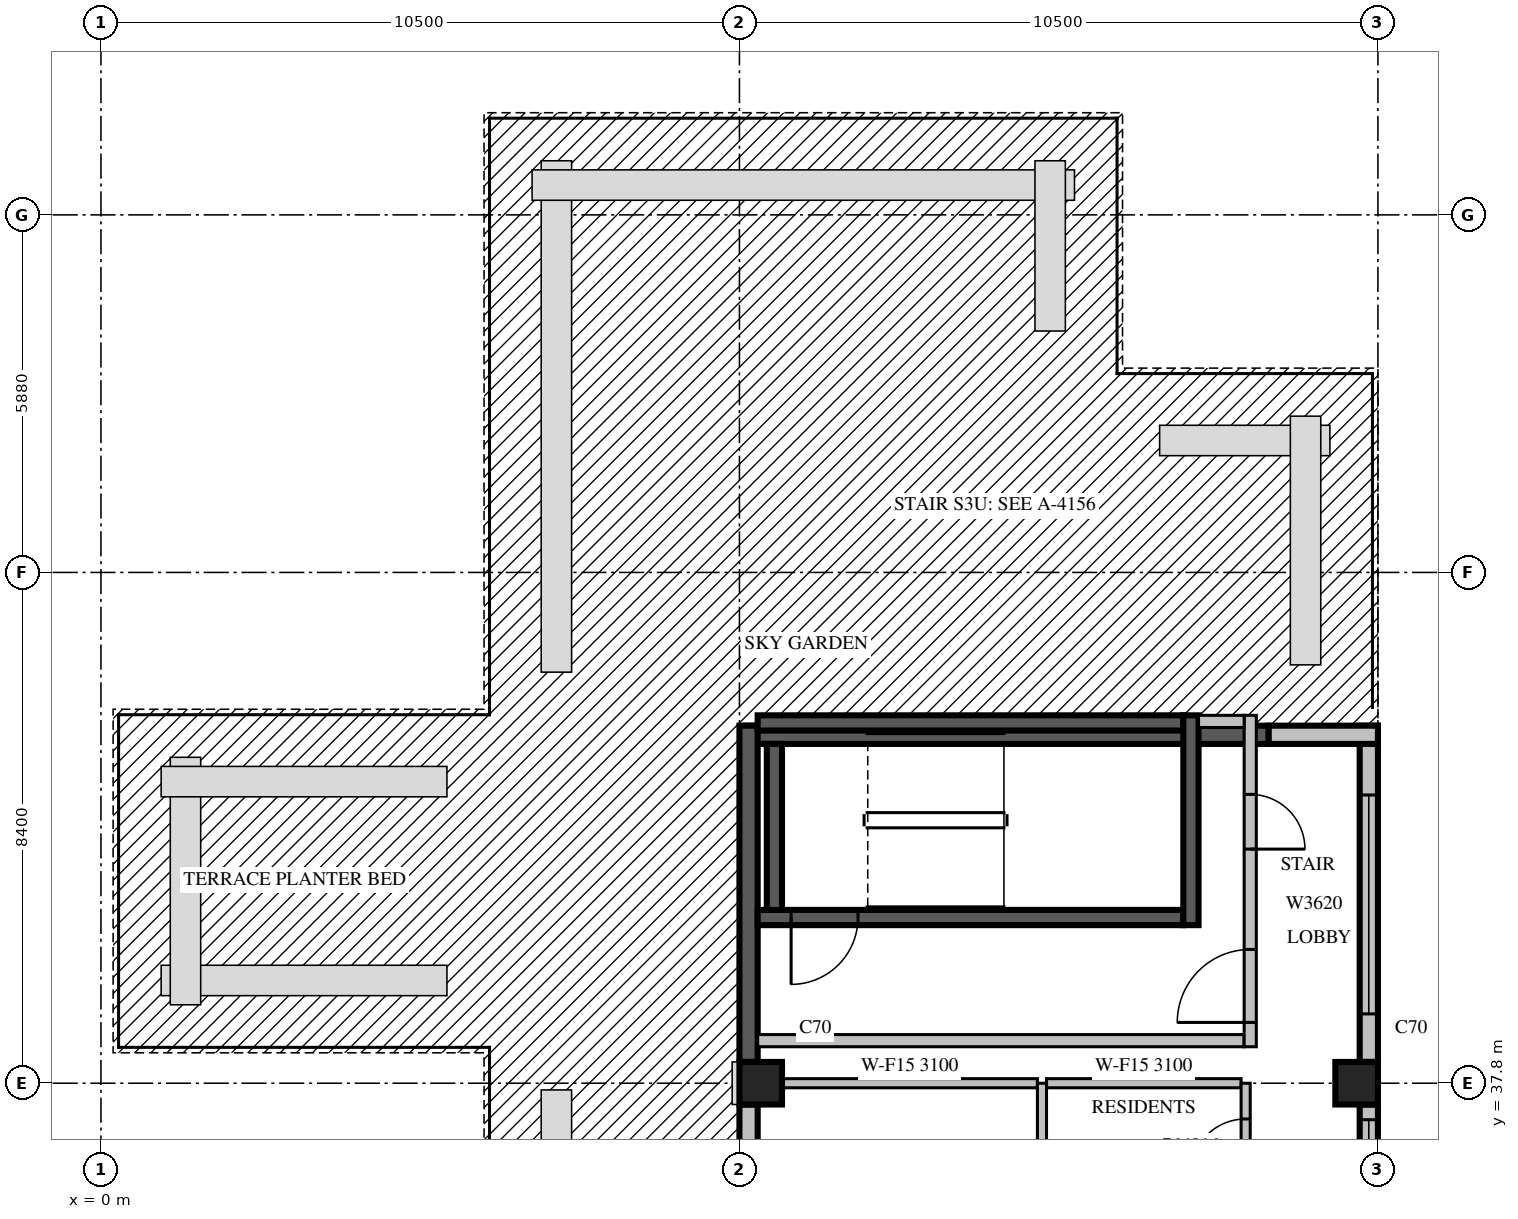
"""IFC4 building model, lengths in metres.
Left out: names, types, materials, properties, quantities, classifications, styles, units other than length and angle.
Written with IfcOpenShell. Run it as: python <this file> out.ifc"""

import sys

from ifc_helpers import new_model, si_unit, direction, frame, frame_2d, origin, origin_2d, place, context, subcontext, project, spatial, rectangle, extrude, source, transform, mapped, element, fill, save


model = new_model("IFC4")
c1 = context("Model", 3, precision=1e-05, world=origin(), true_north=direction((0.0, 1.0)))
c2 = subcontext(c1, "Body", "Model", "MODEL_VIEW")
j1 = project(units=[si_unit("LENGTHUNIT", "METRE"), si_unit("PLANEANGLEUNIT", "RADIAN")], contexts=[c1])
p1 = place(None, origin())
s1 = spatial("IfcSite", under=j1, at=p1, CompositionType="ELEMENT")
p2 = place(p1, origin())
s2 = spatial("IfcBuilding", under=s1, at=p2, CompositionType="ELEMENT")
p3 = place(p2, frame((0.0, 0.0, 284.5)))
s3 = spatial("IfcBuildingStorey", under=s2, at=p3, CompositionType="ELEMENT", Elevation=284.5)
m1 = source(origin(), c2, "Body", "SweptSolid", [
    extrude(rectangle(XDim=0.7, YDim=0.7, at=origin_2d()), origin(), (0.0, 0.0, 1.0), 3.5),
])
for number, where, z_axis, x_axis in (
    (1, (10.85, 37.8, 0.0), (0.0, 0.0, 1.0), (1.0, 0.0, 0.0)),
    (2, (20.65, 37.8, 0.0), (0.0, 0.0, 1.0), (1.0, 0.0, 0.0)),
):
    element("IfcColumn", number, at=place(p3, frame(where, z_axis=z_axis, x_axis=x_axis)), inside=s3, PredefinedType="COLUMN", context=c2, shape_type="MappedRepresentation", body=[
        mapped(m1, transform((0.0, 0.0, 0.0), scale=1.0)),
    ])
p4 = place(p3, frame((20.85, 29.75, 0.0), z_axis=(0.0, 0.0, 1.0), x_axis=(0.0, 1.0, 0.0)))
e3 = element("IfcWall", 3, at=p4, inside=s3, PredefinedType="STANDARD", context=c2, shape_type="SweptSolid", body=[
    extrude(rectangle(XDim=7.7, YDim=0.3, at=frame_2d((3.85, 0.0))), origin(), (0.0, 0.0, 1.0), 2.6),
])
m2 = source(origin(), c2, "Body", "SweptSolid", [
    extrude(rectangle(XDim=3.0, YDim=2.0, at=frame_2d((1.5, 1.0))), frame((0.0, 0.16, 0.0), z_axis=(0.0, -1.0, 0.0), x_axis=(1.0, 0.0, 0.0)), (0.0, 0.0, 1.0), 0.32),
])
p5 = place(p4, frame((0.25, 0.0, 0.6)))
e4 = element("IfcOpeningElement", 4, at=p5, cuts=e3, PredefinedType="OPENING", context=c2, shape_type="MappedRepresentation", body=[
    mapped(m2, transform((0.0, 0.0, 0.0), scale=1.0)),
])
p6 = place(p4, frame((4.45, 0.0, 0.6)))
e5 = element("IfcOpeningElement", 5, at=p6, cuts=e3, PredefinedType="OPENING", context=c2, shape_type="MappedRepresentation", body=[
    mapped(m2, transform((0.0, 0.0, 0.0), scale=1.0)),
])
p7 = place(p3, frame((20.85, 38.15, 0.0), z_axis=(0.0, 0.0, 1.0), x_axis=(0.0, 1.0, 0.0)))
e6 = element("IfcWall", 6, at=p7, inside=s3, PredefinedType="STANDARD", context=c2, shape_type="SweptSolid", body=[
    extrude(rectangle(XDim=5.53, YDim=0.3, at=frame_2d((2.765, 0.0))), origin(), (0.0, 0.0, 1.0), 3.1),
])
m3 = source(origin(), c2, "Body", "SweptSolid", [
    extrude(rectangle(XDim=3.6, YDim=2.0, at=frame_2d((1.8, 1.0))), frame((0.0, 0.16, 0.0), z_axis=(0.0, -1.0, 0.0), x_axis=(1.0, 0.0, 0.0)), (0.0, 0.0, 1.0), 0.32),
])
p8 = place(p7, frame((0.79, 0.0, 0.6)))
e7 = element("IfcOpeningElement", 7, at=p8, cuts=e6, PredefinedType="OPENING", context=c2, shape_type="MappedRepresentation", body=[
    mapped(m3, transform((0.0, 0.0, 0.0), scale=1.0)),
])
p9 = place(p3, frame((21.0, 43.53, 0.0), z_axis=(0.0, 0.0, 1.0), x_axis=(-1.0, 0.0, 0.0)))
e8 = element("IfcWall", 8, at=p9, inside=s3, PredefinedType="STANDARD", context=c2, shape_type="SweptSolid", body=[
    extrude(rectangle(XDim=1.8, YDim=0.3, at=frame_2d((0.9, 0.0))), origin(), (0.0, 0.0, 1.0), 3.1),
])
p10 = place(p3, frame((19.2, 43.53, 0.0), z_axis=(0.0, 0.0, 1.0), x_axis=(-1.0, 0.0, 0.0)))
e9 = element("IfcWall", 9, at=p10, inside=s3, PredefinedType="SOLIDWALL", context=c2, shape_type="SweptSolid", body=[
    extrude(rectangle(XDim=8.6, YDim=0.3, at=frame_2d((4.3, 0.0))), origin(), (0.0, 0.0, 1.0), 3.1),
])
p11 = place(p3, frame((10.65, 43.68, 0.0), z_axis=(0.0, 0.0, 1.0), x_axis=(0.0, -1.0, 0.0)))
e10 = element("IfcWall", 10, at=p11, inside=s3, PredefinedType="SOLIDWALL", context=c2, shape_type="SweptSolid", body=[
    extrude(rectangle(XDim=5.53, YDim=0.3, at=frame_2d((2.765, 0.0))), origin(), (0.0, 0.0, 1.0), 3.1),
])
m4 = source(origin(), c2, "Body", "SweptSolid", [
    extrude(rectangle(XDim=7.7, YDim=0.3, at=frame_2d((3.85, 0.0))), origin(), (0.0, 0.0, 1.0), 3.1),
])
p12 = place(p3, frame((10.65, 37.45, 0.0), z_axis=(0.0, 0.0, 1.0), x_axis=(0.0, -1.0, 0.0)))
e11 = element("IfcWall", 11, at=p12, inside=s3, PredefinedType="STANDARD", context=c2, shape_type="MappedRepresentation", body=[
    mapped(m4, transform((0.0, 0.0, 0.0), scale=1.0)),
])
m5 = source(origin(), c2, "Body", "SweptSolid", [
    extrude(rectangle(XDim=1.8, YDim=2.4, at=frame_2d((0.9, 1.2))), frame((0.0, 0.16, 0.0), z_axis=(0.0, -1.0, 0.0), x_axis=(1.0, 0.0, 0.0)), (0.0, 0.0, 1.0), 0.32),
])
p13 = place(p12, frame((3.37, 0.0, 0.0)))
e12 = element("IfcOpeningElement", 12, at=p13, cuts=e11, PredefinedType="OPENING", context=c2, shape_type="MappedRepresentation", body=[
    mapped(m5, transform((0.0, 0.0, 0.0), scale=1.0)),
])
m6 = source(origin(), c2, "Body", "SweptSolid", [
    extrude(rectangle(XDim=1.8, YDim=2.0, at=frame_2d((0.9, 1.0))), frame((0.0, 0.16, 0.0), z_axis=(0.0, -1.0, 0.0), x_axis=(1.0, 0.0, 0.0)), (0.0, 0.0, 1.0), 0.32),
])
p14 = place(p12, frame((0.735, 0.0, 0.6)))
e13 = element("IfcOpeningElement", 13, at=p14, cuts=e11, PredefinedType="OPENING", context=c2, shape_type="MappedRepresentation", body=[
    mapped(m6, transform((0.0, 0.0, 0.0), scale=1.0)),
])
m7 = source(origin(), c2, "Body", "SweptSolid", [
    extrude(rectangle(XDim=7.0, YDim=0.25, at=frame_2d((3.5, 0.0))), origin(), (0.0, 0.0, 1.0), 3.1),
])
p15 = place(p3, frame((10.8, 40.525, 0.0), z_axis=(0.0, 0.0, 1.0), x_axis=(1.0, 0.0, 0.0)))
e14 = element("IfcWall", 14, at=p15, inside=s3, PredefinedType="SOLIDWALL", context=c2, shape_type="MappedRepresentation", body=[
    mapped(m7, transform((0.0, 0.0, 0.0), scale=1.0)),
])
m8 = source(origin(), c2, "Body", "SweptSolid", [
    extrude(rectangle(XDim=1.1, YDim=2.1, at=frame_2d((0.55, 1.05))), frame((0.0, 0.135, 0.0), z_axis=(0.0, -1.0, 0.0), x_axis=(1.0, 0.0, 0.0)), (0.0, 0.0, 1.0), 0.27),
])
p16 = place(p15, frame((0.55, 0.0, 0.0)))
e15 = element("IfcOpeningElement", 15, at=p16, cuts=e14, PredefinedType="OPENING", context=c2, shape_type="MappedRepresentation", body=[
    mapped(m8, transform((0.0, 0.0, 0.0), scale=1.0)),
])
p17 = place(p3, frame((10.8, 43.725, 0.0), z_axis=(0.0, 0.0, 1.0), x_axis=(1.0, 0.0, 0.0)))
e16 = element("IfcWall", 16, at=p17, inside=s3, PredefinedType="SOLIDWALL", context=c2, shape_type="MappedRepresentation", body=[
    mapped(m7, transform((0.0, 0.0, 0.0), scale=1.0)),
])
m9 = source(origin(), c2, "Body", "SweptSolid", [
    extrude(rectangle(XDim=3.45, YDim=0.25, at=frame_2d((1.725, 0.0))), origin(), (0.0, 0.0, 1.0), 3.1),
])
p18 = place(p3, frame((17.925, 40.4, 0.0), z_axis=(0.0, 0.0, 1.0), x_axis=(0.0, 1.0, 0.0)))
e17 = element("IfcWall", 17, at=p18, inside=s3, PredefinedType="SOLIDWALL", context=c2, shape_type="MappedRepresentation", body=[
    mapped(m9, transform((0.0, 0.0, 0.0), scale=1.0)),
])
p19 = place(p3, frame((11.075, 40.65, 0.0), z_axis=(0.0, 0.0, 1.0), x_axis=(0.0, 1.0, 0.0)))
e18 = element("IfcWall", 18, at=p19, inside=s3, PredefinedType="SOLIDWALL", context=c2, shape_type="SweptSolid", body=[
    extrude(rectangle(XDim=2.73, YDim=0.25, at=frame_2d((1.365, 0.0))), origin(), (0.0, 0.0, 1.0), 3.1),
])
m10 = source(origin(), c2, "Body", "SweptSolid", [
    extrude(rectangle(XDim=8.0, YDim=0.2, at=frame_2d((4.0, 0.0))), origin(), (0.0, 0.0, 1.0), 3.1),
])
p20 = place(p3, frame((10.8, 38.5, 0.0), z_axis=(0.0, 0.0, 1.0), x_axis=(1.0, 0.0, 0.0)))
e19 = element("IfcWall", 19, at=p20, inside=s3, PredefinedType="PARTITIONING", context=c2, shape_type="MappedRepresentation", body=[
    mapped(m10, transform((0.0, 0.0, 0.0), scale=1.0)),
])
m11 = source(origin(), c2, "Body", "SweptSolid", [
    extrude(rectangle(XDim=5.45, YDim=0.2, at=frame_2d((2.725, 0.0))), origin(), (0.0, 0.0, 1.0), 3.1),
])
p21 = place(p3, frame((18.9, 38.4, 0.0), z_axis=(0.0, 0.0, 1.0), x_axis=(0.0, 1.0, 0.0)))
e20 = element("IfcWall", 20, at=p21, inside=s3, PredefinedType="PARTITIONING", context=c2, shape_type="MappedRepresentation", body=[
    mapped(m11, transform((0.0, 0.0, 0.0), scale=1.0)),
])
m12 = source(origin(), c2, "Body", "SweptSolid", [
    extrude(rectangle(XDim=1.2, YDim=2.1, at=frame_2d((0.6, 1.05))), frame((0.0, 0.11, 0.0), z_axis=(0.0, -1.0, 0.0), x_axis=(1.0, 0.0, 0.0)), (0.0, 0.0, 1.0), 0.22),
])
p22 = place(p21, frame((0.4, 0.0, 0.0)))
e21 = element("IfcOpeningElement", 21, at=p22, cuts=e20, PredefinedType="OPENING", context=c2, shape_type="MappedRepresentation", body=[
    mapped(m12, transform((0.0, 0.0, 0.0), scale=1.0)),
])
m13 = source(origin(), c2, "Body", "SweptSolid", [
    extrude(rectangle(XDim=0.9, YDim=2.1, at=frame_2d((0.45, 1.05))), frame((0.0, 0.11, 0.0), z_axis=(0.0, -1.0, 0.0), x_axis=(1.0, 0.0, 0.0)), (0.0, 0.0, 1.0), 0.22),
])
p23 = place(p21, frame((3.25, 0.0, 0.0)))
e22 = element("IfcOpeningElement", 22, at=p23, cuts=e20, PredefinedType="OPENING", context=c2, shape_type="MappedRepresentation", body=[
    mapped(m13, transform((0.0, 0.0, 0.0), scale=1.0)),
])
m14 = source(origin(), c2, "Body", "SweptSolid", [
    extrude(rectangle(XDim=0.75, YDim=0.2, at=frame_2d((0.375, 0.0))), origin(), (0.0, 0.0, 1.0), 3.1),
])
p24 = place(p3, frame((18.05, 43.75, 0.0), z_axis=(0.0, 0.0, 1.0), x_axis=(1.0, 0.0, 0.0)))
e23 = element("IfcWall", 23, at=p24, inside=s3, PredefinedType="PARTITIONING", context=c2, shape_type="MappedRepresentation", body=[
    mapped(m14, transform((0.0, 0.0, 0.0), scale=1.0)),
])
m15 = source(origin(), c2, "Body", "SweptSolid", [
    extrude(rectangle(XDim=4.201, YDim=0.15, at=frame_2d((2.1, 0.0))), origin(), (0.0, 0.0, 1.0), 3.1),
])
p25 = place(p3, frame((15.4, 37.8, 0.0), z_axis=(0.0, 0.0, 1.0), x_axis=(-1.0, 0.0, 0.0)))
e24 = element("IfcWall", 24, at=p25, inside=s3, PredefinedType="PARTITIONING", context=c2, shape_type="MappedRepresentation", body=[
    mapped(m15, transform((0.0, 0.0, 0.0), scale=1.0)),
])
m16 = source(origin(), c2, "Body", "SweptSolid", [
    extrude(rectangle(XDim=3.2, YDim=0.15, at=frame_2d((1.6, 0.0))), origin(), (0.0, 0.0, 1.0), 3.1),
])
p26 = place(p3, frame((18.75, 37.8, 0.0), z_axis=(0.0, 0.0, 1.0), x_axis=(-1.0, 0.0, 0.0)))
e25 = element("IfcWall", 25, at=p26, inside=s3, PredefinedType="PARTITIONING", context=c2, shape_type="MappedRepresentation", body=[
    mapped(m16, transform((0.0, 0.0, 0.0), scale=1.0)),
])
p27 = place(p3, frame((15.475, 29.4, 0.0), z_axis=(0.0, 0.0, 1.0), x_axis=(0.0, 1.0, 0.0)))
e26 = element("IfcWall", 26, at=p27, inside=s3, PredefinedType="PARTITIONING", context=c2, shape_type="SweptSolid", body=[
    extrude(rectangle(XDim=8.4, YDim=0.15, at=frame_2d((4.2, 0.0))), origin(), (0.0, 0.0, 1.0), 2.6),
])
m17 = source(origin(), c2, "Body", "SweptSolid", [
    extrude(rectangle(XDim=1.2, YDim=2.1, at=frame_2d((0.6, 1.05))), frame((0.0, 0.085, 0.0), z_axis=(0.0, -1.0, 0.0), x_axis=(1.0, 0.0, 0.0)), (0.0, 0.0, 1.0), 0.17),
])
p28 = place(p27, frame((2.612, 0.0, 0.0)))
e27 = element("IfcOpeningElement", 27, at=p28, cuts=e26, PredefinedType="OPENING", context=c2, shape_type="MappedRepresentation", body=[
    mapped(m17, transform((0.0, 0.0, 0.0), scale=1.0)),
])
m18 = source(origin(), c2, "Body", "SweptSolid", [
    extrude(rectangle(XDim=8.4, YDim=0.15, at=frame_2d((4.2, 0.0))), origin(), (0.0, 0.0, 1.0), 2.6),
])
p29 = place(p3, frame((18.825, 29.4, 0.0), z_axis=(0.0, 0.0, 1.0), x_axis=(0.0, 1.0, 0.0)))
e28 = element("IfcWall", 28, at=p29, inside=s3, PredefinedType="PARTITIONING", context=c2, shape_type="MappedRepresentation", body=[
    mapped(m18, transform((0.0, 0.0, 0.0), scale=1.0)),
])
p30 = place(p29, frame((2.562, 0.0, 0.0)))
e29 = element("IfcOpeningElement", 29, at=p30, cuts=e28, PredefinedType="OPENING", context=c2, shape_type="MappedRepresentation", body=[
    mapped(m17, transform((0.0, 0.0, 0.0), scale=1.0)),
])
m19 = source(origin(), c2, "Body", "SweptSolid", [
    extrude(rectangle(XDim=0.9, YDim=2.1, at=frame_2d((0.45, 1.05))), frame((0.0, 0.085, 0.0), z_axis=(0.0, -1.0, 0.0), x_axis=(1.0, 0.0, 0.0)), (0.0, 0.0, 1.0), 0.17),
])
p31 = place(p29, frame((6.912, 0.0, 0.0)))
e30 = element("IfcOpeningElement", 30, at=p31, cuts=e28, PredefinedType="OPENING", context=c2, shape_type="MappedRepresentation", body=[
    mapped(m19, transform((0.0, 0.0, 0.0), scale=1.0)),
])
m20 = source(origin(), c2, "Body", "SweptSolid", [
    extrude(rectangle(XDim=3.0, YDim=2.0, at=frame_2d((1.5, 1.0))), frame((0.0, 0.03, 0.0), z_axis=(0.0, -1.0, 0.0), x_axis=(1.0, 0.0, 0.0)), (0.0, 0.0, 1.0), 0.06),
])
p32 = place(p6, origin())
e31 = element("IfcWindow", 31, at=p32, inside=s3, PartitioningType="SINGLE_PANEL", PredefinedType="WINDOW", context=c2, shape_type="MappedRepresentation", body=[
    mapped(m20, transform((0.0, 0.0, 0.0), scale=1.0)),
])
fill(e5, e31)
m21 = source(origin(), c2, "Body", "SweptSolid", [
    extrude(rectangle(XDim=3.6, YDim=2.0, at=frame_2d((1.8, 1.0))), frame((0.0, 0.03, 0.0), z_axis=(0.0, -1.0, 0.0), x_axis=(1.0, 0.0, 0.0)), (0.0, 0.0, 1.0), 0.06),
])
p33 = place(p8, origin())
e32 = element("IfcWindow", 32, at=p33, inside=s3, PartitioningType="SINGLE_PANEL", PredefinedType="WINDOW", context=c2, shape_type="MappedRepresentation", body=[
    mapped(m21, transform((0.0, 0.0, 0.0), scale=1.0)),
])
fill(e7, e32)
m22 = source(origin(), c2, "Body", "SweptSolid", [
    extrude(rectangle(XDim=1.1, YDim=2.1, at=frame_2d((0.55, 1.05))), frame((0.0, 0.025, 0.0), z_axis=(0.0, -1.0, 0.0), x_axis=(1.0, 0.0, 0.0)), (0.0, 0.0, 1.0), 0.05),
])
p34 = place(p16, origin())
e33 = element("IfcDoor", 33, at=p34, inside=s3, OperationType="SINGLE_SWING_RIGHT", PredefinedType="DOOR", context=c2, shape_type="MappedRepresentation", body=[
    mapped(m22, transform((0.0, 0.0, 0.0), scale=1.0)),
])
fill(e15, e33)
m23 = source(origin(), c2, "Body", "SweptSolid", [
    extrude(rectangle(XDim=1.2, YDim=2.1, at=frame_2d((0.6, 1.05))), frame((0.0, 0.025, 0.0), z_axis=(0.0, -1.0, 0.0), x_axis=(1.0, 0.0, 0.0)), (0.0, 0.0, 1.0), 0.05),
])
p35 = place(p22, origin())
e34 = element("IfcDoor", 34, at=p35, inside=s3, OperationType="SINGLE_SWING_LEFT", PredefinedType="DOOR", context=c2, shape_type="MappedRepresentation", body=[
    mapped(m23, transform((0.0, 0.0, 0.0), scale=1.0)),
])
fill(e21, e34)
m24 = source(origin(), c2, "Body", "SweptSolid", [
    extrude(rectangle(XDim=0.9, YDim=2.1, at=frame_2d((0.45, 1.05))), frame((0.0, 0.025, 0.0), z_axis=(0.0, -1.0, 0.0), x_axis=(1.0, 0.0, 0.0)), (0.0, 0.0, 1.0), 0.05),
])
p36 = place(p23, origin())
e35 = element("IfcDoor", 35, at=p36, inside=s3, OperationType="SINGLE_SWING_RIGHT", PredefinedType="DOOR", context=c2, shape_type="MappedRepresentation", body=[
    mapped(m24, transform((0.0, 0.0, 0.0), scale=1.0)),
])
fill(e22, e35)
p37 = place(p31, origin())
e36 = element("IfcDoor", 36, at=p37, inside=s3, OperationType="SINGLE_SWING_LEFT", PredefinedType="DOOR", context=c2, shape_type="MappedRepresentation", body=[
    mapped(m24, transform((0.0, 0.0, 0.0), scale=1.0)),
])
fill(e30, e36)
save(model, sys.argv[1])
